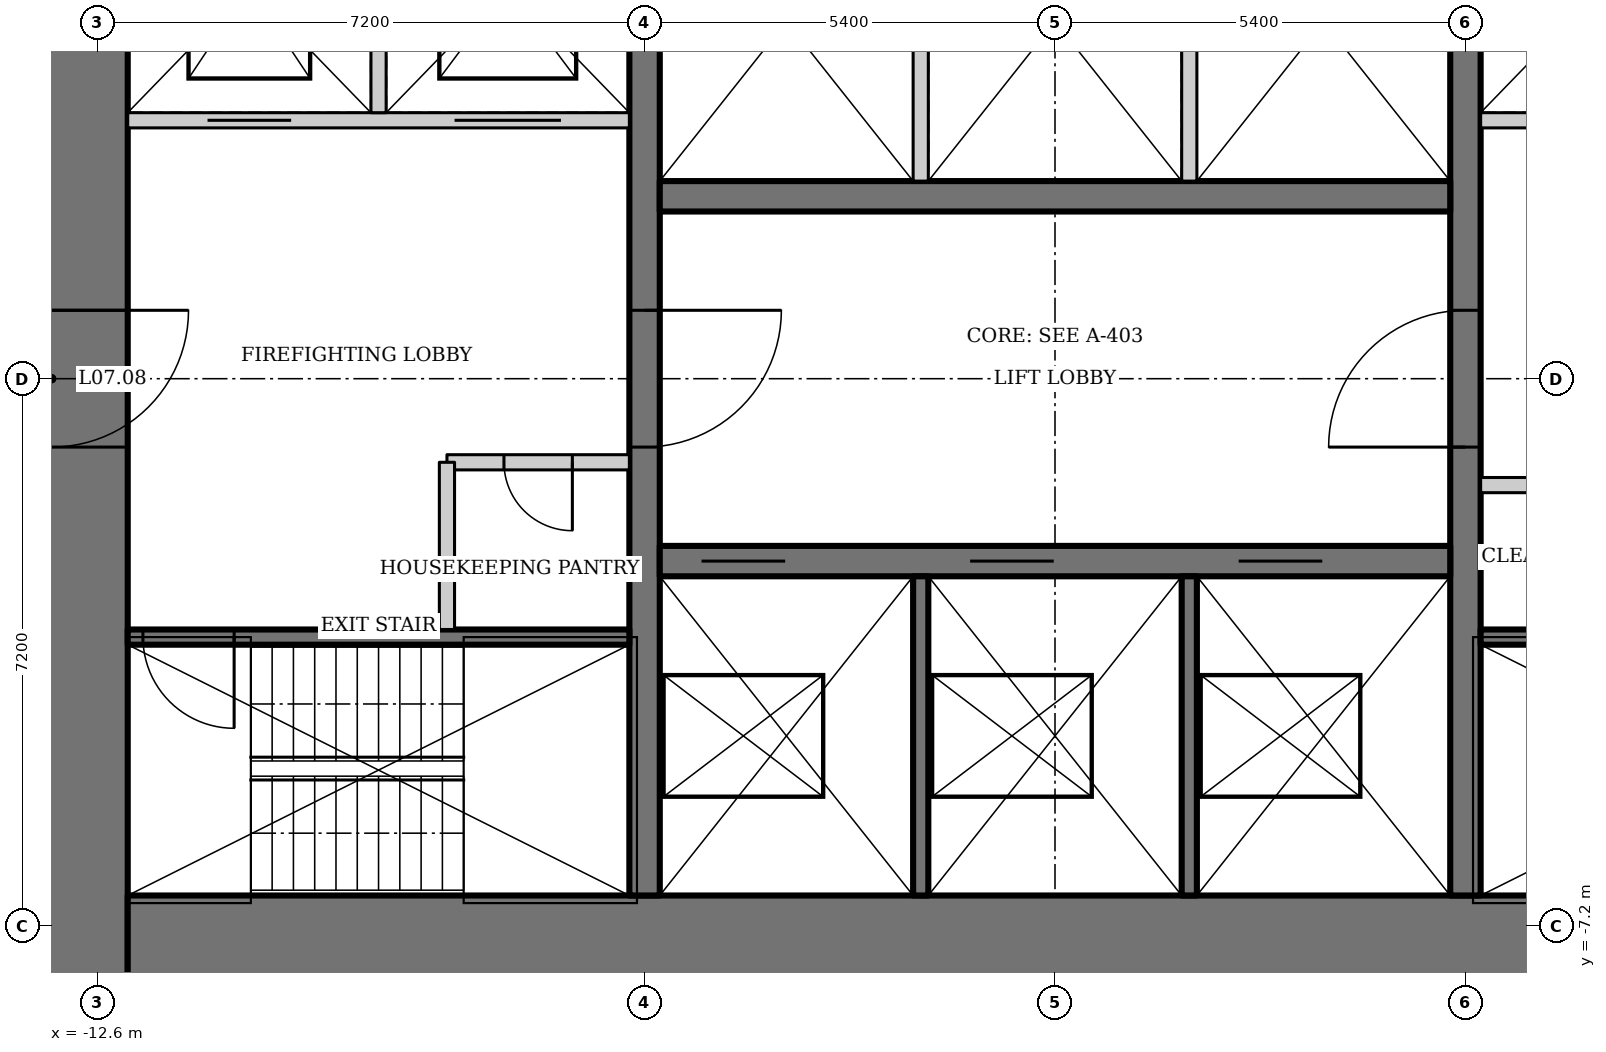
"""IFC4 building model, lengths in metres.
Left out: names, types, materials, properties, quantities, classifications, styles, units other than length and angle.
Written with IfcOpenShell. Run it as: python <this file> out.ifc"""

import sys

from ifc_helpers import new_model, si_unit, direction, frame, frame_2d, origin, place, context, subcontext, project, spatial, rectangle, extrude, element, fill, save


model = new_model("IFC4")
c1 = context("Model", 3, precision=1e-05, world=origin(), true_north=direction((0.0, 1.0)))
c2 = subcontext(c1, "Body", "Model", "MODEL_VIEW")
j1 = project(units=[si_unit("LENGTHUNIT", "METRE"), si_unit("PLANEANGLEUNIT", "RADIAN")], contexts=[c1])
p1 = place(None, origin())
s1 = spatial("IfcSite", under=j1, at=p1, CompositionType="ELEMENT")
p2 = place(p1, origin())
s2 = spatial("IfcBuilding", under=s1, at=p2, CompositionType="ELEMENT")
p3 = place(p2, frame((0.0, 0.0, 40.6)))
s3 = spatial("IfcBuildingStorey", under=s2, at=p3, CompositionType="ELEMENT", Elevation=40.6)
p4 = place(p3, frame((-13.2, 13.0, 0.0), z_axis=(0.0, 0.0, 1.0), x_axis=(0.0, -1.0, 0.0)))
e1 = element("IfcWall", 1, at=p4, inside=s3, PredefinedType="SHEAR", context=c2, shape_type="SweptSolid", body=[
    extrude(rectangle(XDim=26.0, YDim=2.0, at=frame_2d((13.0, 0.0))), origin(), (0.0, 0.0, 1.0), 3.6),
])
p5 = place(p4, frame((12.1, 0.0, 0.0)))
e2 = element("IfcOpeningElement", 2, at=p5, cuts=e1, PredefinedType="OPENING", context=c2, shape_type="SweptSolid", body=[
    extrude(rectangle(XDim=1.8, YDim=2.1, at=frame_2d((0.9, 1.05))), frame((0.0, 1.01, 0.0), z_axis=(0.0, -1.0, 0.0), x_axis=(1.0, 0.0, 0.0)), (0.0, 0.0, 1.0), 2.02),
])
p6 = place(p3, frame((-12.2, -8.0, 0.0), z_axis=(0.0, 0.0, 1.0), x_axis=(1.0, 0.0, 0.0)))
e3 = element("IfcWall", 3, at=p6, inside=s3, PredefinedType="SHEAR", context=c2, shape_type="SweptSolid", body=[
    extrude(rectangle(XDim=24.4, YDim=2.4, at=frame_2d((12.2, 0.0))), origin(), (0.0, 0.0, 1.0), 3.6),
])
p7 = place(p3, frame((5.4, -6.8, 0.0), z_axis=(0.0, 0.0, 1.0), x_axis=(0.0, 1.0, 0.0)))
e4 = element("IfcWall", 4, at=p7, inside=s3, PredefinedType="SHEAR", context=c2, shape_type="SweptSolid", body=[
    extrude(rectangle(XDim=13.6, YDim=0.4, at=frame_2d((6.8, 0.0))), origin(), (0.0, 0.0, 1.0), 3.6),
])
p8 = place(p7, frame((5.9, 0.0, 0.0)))
e5 = element("IfcOpeningElement", 5, at=p8, cuts=e4, PredefinedType="OPENING", context=c2, shape_type="SweptSolid", body=[
    extrude(rectangle(XDim=1.8, YDim=2.1, at=frame_2d((0.9, 1.05))), frame((0.0, 0.21, 0.0), z_axis=(0.0, -1.0, 0.0), x_axis=(1.0, 0.0, 0.0)), (0.0, 0.0, 1.0), 0.42),
])
p9 = place(p3, frame((-5.4, 6.8, 0.0), z_axis=(0.0, 0.0, 1.0), x_axis=(0.0, -1.0, 0.0)))
e6 = element("IfcWall", 6, at=p9, inside=s3, PredefinedType="SHEAR", context=c2, shape_type="SweptSolid", body=[
    extrude(rectangle(XDim=13.6, YDim=0.4, at=frame_2d((6.8, 0.0))), origin(), (0.0, 0.0, 1.0), 3.6),
])
p10 = place(p9, frame((5.9, 0.0, 0.0)))
e7 = element("IfcOpeningElement", 7, at=p10, cuts=e6, PredefinedType="OPENING", context=c2, shape_type="SweptSolid", body=[
    extrude(rectangle(XDim=1.8, YDim=2.1, at=frame_2d((0.9, 1.05))), frame((0.0, 0.21, 0.0), z_axis=(0.0, -1.0, 0.0), x_axis=(1.0, 0.0, 0.0)), (0.0, 0.0, 1.0), 0.42),
])
p11 = place(p3, frame((-5.2, -2.4, 0.0), z_axis=(0.0, 0.0, 1.0), x_axis=(1.0, 0.0, 0.0)))
e8 = element("IfcWall", 8, at=p11, inside=s3, PredefinedType="SHEAR", context=c2, shape_type="SweptSolid", body=[
    extrude(rectangle(XDim=10.4, YDim=0.4, at=frame_2d((5.2, 0.0))), origin(), (0.0, 0.0, 1.0), 3.6),
])
p12 = place(p11, frame((0.55, 0.0, 0.0)))
e9 = element("IfcOpeningElement", 9, at=p12, cuts=e8, PredefinedType="OPENING", context=c2, shape_type="SweptSolid", body=[
    extrude(rectangle(XDim=1.1, YDim=2.2, at=frame_2d((0.55, 1.1))), frame((0.0, 0.21, 0.0), z_axis=(0.0, -1.0, 0.0), x_axis=(1.0, 0.0, 0.0)), (0.0, 0.0, 1.0), 0.42),
])
p13 = place(p11, frame((4.083, 0.0, 0.0)))
e10 = element("IfcOpeningElement", 10, at=p13, cuts=e8, PredefinedType="OPENING", context=c2, shape_type="SweptSolid", body=[
    extrude(rectangle(XDim=1.1, YDim=2.2, at=frame_2d((0.55, 1.1))), frame((0.0, 0.21, 0.0), z_axis=(0.0, -1.0, 0.0), x_axis=(1.0, 0.0, 0.0)), (0.0, 0.0, 1.0), 0.42),
])
p14 = place(p11, frame((7.617, 0.0, 0.0)))
e11 = element("IfcOpeningElement", 11, at=p14, cuts=e8, PredefinedType="OPENING", context=c2, shape_type="SweptSolid", body=[
    extrude(rectangle(XDim=1.1, YDim=2.2, at=frame_2d((0.55, 1.1))), frame((0.0, 0.21, 0.0), z_axis=(0.0, -1.0, 0.0), x_axis=(1.0, 0.0, 0.0)), (0.0, 0.0, 1.0), 0.42),
])
for number, where, z_axis, x_axis in (
    (12, (-1.767, -2.6, 0.0), (0.0, 0.0, 1.0), (0.0, -1.0, 0.0)),
    (13, (1.767, -2.6, 0.0), (0.0, 0.0, 1.0), (0.0, -1.0, 0.0)),
):
    element("IfcWall", number, at=place(p3, frame(where, z_axis=z_axis, x_axis=x_axis)), inside=s3, PredefinedType="SOLIDWALL", context=c2, shape_type="SweptSolid", body=[
        extrude(rectangle(XDim=4.2, YDim=0.2, at=frame_2d((2.1, 0.0))), origin(), (0.0, 0.0, 1.0), 3.6),
    ])
p15 = place(p3, frame((5.2, 2.4, 0.0), z_axis=(0.0, 0.0, 1.0), x_axis=(-1.0, 0.0, 0.0)))
e14 = element("IfcWall", 14, at=p15, inside=s3, PredefinedType="SHEAR", context=c2, shape_type="SweptSolid", body=[
    extrude(rectangle(XDim=10.4, YDim=0.4, at=frame_2d((5.2, 0.0))), origin(), (0.0, 0.0, 1.0), 3.6),
])
for number, where, z_axis, x_axis in (
    (15, (-1.767, 2.6, 0.0), (0.0, 0.0, 1.0), (0.0, 1.0, 0.0)),
    (16, (1.767, 2.6, 0.0), (0.0, 0.0, 1.0), (0.0, 1.0, 0.0)),
):
    element("IfcWall", number, at=place(p3, frame(where, z_axis=z_axis, x_axis=x_axis)), inside=s3, PredefinedType="SOLIDWALL", context=c2, shape_type="SweptSolid", body=[
        extrude(rectangle(XDim=4.2, YDim=0.2, at=frame_2d((2.1, 0.0))), origin(), (0.0, 0.0, 1.0), 3.6),
    ])
p16 = place(p3, frame((5.6, -3.4, 0.0), z_axis=(0.0, 0.0, 1.0), x_axis=(1.0, 0.0, 0.0)))
e17 = element("IfcWall", 17, at=p16, inside=s3, PredefinedType="SHEAR", context=c2, shape_type="SweptSolid", body=[
    extrude(rectangle(XDim=6.6, YDim=0.2, at=frame_2d((3.3, 0.0))), origin(), (0.0, 0.0, 1.0), 3.6),
])
p17 = place(p16, frame((5.2, 0.0, 0.0)))
e18 = element("IfcOpeningElement", 18, at=p17, cuts=e17, PredefinedType="OPENING", context=c2, shape_type="SweptSolid", body=[
    extrude(rectangle(XDim=1.2, YDim=2.1, at=frame_2d((0.6, 1.05))), frame((0.0, 0.11, 0.0), z_axis=(0.0, -1.0, 0.0), x_axis=(1.0, 0.0, 0.0)), (0.0, 0.0, 1.0), 0.22),
])
p18 = place(p3, frame((12.2, 3.4, 0.0), z_axis=(0.0, 0.0, 1.0), x_axis=(-1.0, 0.0, 0.0)))
e19 = element("IfcWall", 19, at=p18, inside=s3, PredefinedType="SOLIDWALL", context=c2, shape_type="SweptSolid", body=[
    extrude(rectangle(XDim=6.6, YDim=0.2, at=frame_2d((3.3, 0.0))), origin(), (0.0, 0.0, 1.0), 3.6),
])
p19 = place(p18, frame((4.45, 0.0, 0.0)))
e20 = element("IfcOpeningElement", 20, at=p19, cuts=e19, PredefinedType="OPENING", context=c2, shape_type="SweptSolid", body=[
    extrude(rectangle(XDim=1.1, YDim=2.2, at=frame_2d((0.55, 1.1))), frame((0.0, 0.11, 0.0), z_axis=(0.0, -1.0, 0.0), x_axis=(1.0, 0.0, 0.0)), (0.0, 0.0, 1.0), 0.22),
])
p20 = place(p18, frame((0.9, 0.0, 0.0)))
e21 = element("IfcOpeningElement", 21, at=p20, cuts=e19, PredefinedType="OPENING", context=c2, shape_type="SweptSolid", body=[
    extrude(rectangle(XDim=1.4, YDim=2.2, at=frame_2d((0.7, 1.1))), frame((0.0, 0.11, 0.0), z_axis=(0.0, -1.0, 0.0), x_axis=(1.0, 0.0, 0.0)), (0.0, 0.0, 1.0), 0.22),
])
p21 = place(p3, frame((-5.6, -3.4, 0.0), z_axis=(0.0, 0.0, 1.0), x_axis=(-1.0, 0.0, 0.0)))
e22 = element("IfcWall", 22, at=p21, inside=s3, PredefinedType="SHEAR", context=c2, shape_type="SweptSolid", body=[
    extrude(rectangle(XDim=6.6, YDim=0.2, at=frame_2d((3.3, 0.0))), origin(), (0.0, 0.0, 1.0), 3.6),
])
p22 = place(p21, frame((5.2, 0.0, 0.0)))
e23 = element("IfcOpeningElement", 23, at=p22, cuts=e22, PredefinedType="OPENING", context=c2, shape_type="SweptSolid", body=[
    extrude(rectangle(XDim=1.2, YDim=2.1, at=frame_2d((0.6, 1.05))), frame((0.0, 0.11, 0.0), z_axis=(0.0, -1.0, 0.0), x_axis=(1.0, 0.0, 0.0)), (0.0, 0.0, 1.0), 0.22),
])
p23 = place(p3, frame((-12.2, 3.4, 0.0), z_axis=(0.0, 0.0, 1.0), x_axis=(1.0, 0.0, 0.0)))
e24 = element("IfcWall", 24, at=p23, inside=s3, PredefinedType="SOLIDWALL", context=c2, shape_type="SweptSolid", body=[
    extrude(rectangle(XDim=6.6, YDim=0.2, at=frame_2d((3.3, 0.0))), origin(), (0.0, 0.0, 1.0), 3.6),
])
p24 = place(p23, frame((1.05, 0.0, 0.0)))
e25 = element("IfcOpeningElement", 25, at=p24, cuts=e24, PredefinedType="OPENING", context=c2, shape_type="SweptSolid", body=[
    extrude(rectangle(XDim=1.1, YDim=2.2, at=frame_2d((0.55, 1.1))), frame((0.0, 0.11, 0.0), z_axis=(0.0, -1.0, 0.0), x_axis=(1.0, 0.0, 0.0)), (0.0, 0.0, 1.0), 0.22),
])
p25 = place(p23, frame((4.3, 0.0, 0.0)))
e26 = element("IfcOpeningElement", 26, at=p25, cuts=e24, PredefinedType="OPENING", context=c2, shape_type="SweptSolid", body=[
    extrude(rectangle(XDim=1.4, YDim=2.2, at=frame_2d((0.7, 1.1))), frame((0.0, 0.11, 0.0), z_axis=(0.0, -1.0, 0.0), x_axis=(1.0, 0.0, 0.0)), (0.0, 0.0, 1.0), 0.22),
])
p26 = place(p3, frame((-8.9, 3.5, 0.0), z_axis=(0.0, 0.0, 1.0), x_axis=(0.0, 1.0, 0.0)))
e27 = element("IfcWall", 27, at=p26, inside=s3, PredefinedType="SOLIDWALL", context=c2, shape_type="SweptSolid", body=[
    extrude(rectangle(XDim=3.3, YDim=0.2, at=frame_2d((1.65, 0.0))), origin(), (0.0, 0.0, 1.0), 3.6),
])
p27 = place(p3, frame((-5.6, -1.1, 0.0), z_axis=(0.0, 0.0, 1.0), x_axis=(-1.0, 0.0, 0.0)))
e28 = element("IfcWall", 28, at=p27, inside=s3, PredefinedType="SOLIDWALL", context=c2, shape_type="SweptSolid", body=[
    extrude(rectangle(XDim=2.4, YDim=0.2, at=frame_2d((1.2, 0.0))), origin(), (0.0, 0.0, 1.0), 3.45),
])
p28 = place(p27, frame((0.75, 0.0, 0.0)))
e29 = element("IfcOpeningElement", 29, at=p28, cuts=e28, PredefinedType="OPENING", context=c2, shape_type="SweptSolid", body=[
    extrude(rectangle(XDim=0.9, YDim=2.1, at=frame_2d((0.45, 1.05))), frame((0.0, 0.11, 0.0), z_axis=(0.0, -1.0, 0.0), x_axis=(1.0, 0.0, 0.0)), (0.0, 0.0, 1.0), 0.22),
])
p29 = place(p3, frame((-8.0, -1.1, 0.0), z_axis=(0.0, 0.0, 1.0), x_axis=(0.0, -1.0, 0.0)))
e30 = element("IfcWall", 30, at=p29, inside=s3, PredefinedType="SOLIDWALL", context=c2, shape_type="SweptSolid", body=[
    extrude(rectangle(XDim=2.2, YDim=0.2, at=frame_2d((1.1, 0.0))), origin(), (0.0, 0.0, 1.0), 3.45),
])
p30 = place(p3, frame((5.6, -1.4, 0.0), z_axis=(0.0, 0.0, 1.0), x_axis=(1.0, 0.0, 0.0)))
e31 = element("IfcWall", 31, at=p30, inside=s3, PredefinedType="SOLIDWALL", context=c2, shape_type="SweptSolid", body=[
    extrude(rectangle(XDim=2.6, YDim=0.2, at=frame_2d((1.3, 0.0))), origin(), (0.0, 0.0, 1.0), 3.45),
])
p31 = place(p30, frame((0.85, 0.0, 0.0)))
e32 = element("IfcOpeningElement", 32, at=p31, cuts=e31, PredefinedType="OPENING", context=c2, shape_type="SweptSolid", body=[
    extrude(rectangle(XDim=0.9, YDim=2.1, at=frame_2d((0.45, 1.05))), frame((0.0, 0.11, 0.0), z_axis=(0.0, -1.0, 0.0), x_axis=(1.0, 0.0, 0.0)), (0.0, 0.0, 1.0), 0.22),
])
p32 = place(p28, origin())
e33 = element("IfcDoor", 33, at=p32, inside=s3, OperationType="SINGLE_SWING_LEFT", PredefinedType="DOOR", context=c2, shape_type="SweptSolid", body=[
    extrude(rectangle(XDim=0.9, YDim=2.1, at=frame_2d((0.45, 1.05))), frame((0.0, 0.025, 0.0), z_axis=(0.0, -1.0, 0.0), x_axis=(1.0, 0.0, 0.0)), (0.0, 0.0, 1.0), 0.05),
])
fill(e29, e33)
p33 = place(p8, origin())
e34 = element("IfcDoor", 34, at=p33, inside=s3, OperationType="DOUBLE_DOOR_DOUBLE_SWING", PredefinedType="DOOR", context=c2, shape_type="SweptSolid", body=[
    extrude(rectangle(XDim=1.8, YDim=2.1, at=frame_2d((0.9, 1.05))), frame((0.0, 0.025, 0.0), z_axis=(0.0, -1.0, 0.0), x_axis=(1.0, 0.0, 0.0)), (0.0, 0.0, 1.0), 0.05),
])
fill(e5, e34)
p34 = place(p10, origin())
e35 = element("IfcDoor", 35, at=p34, inside=s3, OperationType="DOUBLE_DOOR_DOUBLE_SWING", PredefinedType="DOOR", context=c2, shape_type="SweptSolid", body=[
    extrude(rectangle(XDim=1.8, YDim=2.1, at=frame_2d((0.9, 1.05))), frame((0.0, 0.025, 0.0), z_axis=(0.0, -1.0, 0.0), x_axis=(1.0, 0.0, 0.0)), (0.0, 0.0, 1.0), 0.05),
])
fill(e7, e35)
p35 = place(p22, origin())
e36 = element("IfcDoor", 36, at=p35, inside=s3, OperationType="SINGLE_SWING_RIGHT", PredefinedType="DOOR", context=c2, shape_type="SweptSolid", body=[
    extrude(rectangle(XDim=1.2, YDim=2.1, at=frame_2d((0.6, 1.05))), frame((0.0, 0.025, 0.0), z_axis=(0.0, -1.0, 0.0), x_axis=(1.0, 0.0, 0.0)), (0.0, 0.0, 1.0), 0.05),
])
fill(e23, e36)
p36 = place(p5, origin())
e37 = element("IfcDoor", 37, at=p36, inside=s3, OperationType="DOUBLE_DOOR_DOUBLE_SWING", PredefinedType="DOOR", context=c2, shape_type="SweptSolid", body=[
    extrude(rectangle(XDim=1.8, YDim=2.1, at=frame_2d((0.9, 1.05))), frame((0.0, 0.025, 0.0), z_axis=(0.0, -1.0, 0.0), x_axis=(1.0, 0.0, 0.0)), (0.0, 0.0, 1.0), 0.05),
])
fill(e2, e37)
p37 = place(p12, origin())
e38 = element("IfcDoor", 38, at=p37, inside=s3, OperationType="DOUBLE_DOOR_SLIDING", PredefinedType="DOOR", context=c2, shape_type="SweptSolid", body=[
    extrude(rectangle(XDim=1.1, YDim=2.2, at=frame_2d((0.55, 1.1))), frame((0.0, 0.025, 0.0), z_axis=(0.0, -1.0, 0.0), x_axis=(1.0, 0.0, 0.0)), (0.0, 0.0, 1.0), 0.05),
])
fill(e9, e38)
p38 = place(p13, origin())
e39 = element("IfcDoor", 39, at=p38, inside=s3, OperationType="DOUBLE_DOOR_SLIDING", PredefinedType="DOOR", context=c2, shape_type="SweptSolid", body=[
    extrude(rectangle(XDim=1.1, YDim=2.2, at=frame_2d((0.55, 1.1))), frame((0.0, 0.025, 0.0), z_axis=(0.0, -1.0, 0.0), x_axis=(1.0, 0.0, 0.0)), (0.0, 0.0, 1.0), 0.05),
])
fill(e10, e39)
p39 = place(p14, origin())
e40 = element("IfcDoor", 40, at=p39, inside=s3, OperationType="DOUBLE_DOOR_SLIDING", PredefinedType="DOOR", context=c2, shape_type="SweptSolid", body=[
    extrude(rectangle(XDim=1.1, YDim=2.2, at=frame_2d((0.55, 1.1))), frame((0.0, 0.025, 0.0), z_axis=(0.0, -1.0, 0.0), x_axis=(1.0, 0.0, 0.0)), (0.0, 0.0, 1.0), 0.05),
])
fill(e11, e40)
p40 = place(p24, origin())
e41 = element("IfcDoor", 41, at=p40, inside=s3, OperationType="DOUBLE_DOOR_SLIDING", PredefinedType="DOOR", context=c2, shape_type="SweptSolid", body=[
    extrude(rectangle(XDim=1.1, YDim=2.2, at=frame_2d((0.55, 1.1))), frame((0.0, 0.025, 0.0), z_axis=(0.0, -1.0, 0.0), x_axis=(1.0, 0.0, 0.0)), (0.0, 0.0, 1.0), 0.05),
])
fill(e25, e41)
p41 = place(p25, origin())
e42 = element("IfcDoor", 42, at=p41, inside=s3, OperationType="DOUBLE_DOOR_SLIDING", PredefinedType="DOOR", context=c2, shape_type="SweptSolid", body=[
    extrude(rectangle(XDim=1.4, YDim=2.2, at=frame_2d((0.7, 1.1))), frame((0.0, 0.025, 0.0), z_axis=(0.0, -1.0, 0.0), x_axis=(1.0, 0.0, 0.0)), (0.0, 0.0, 1.0), 0.05),
])
fill(e26, e42)
save(model, sys.argv[1])
